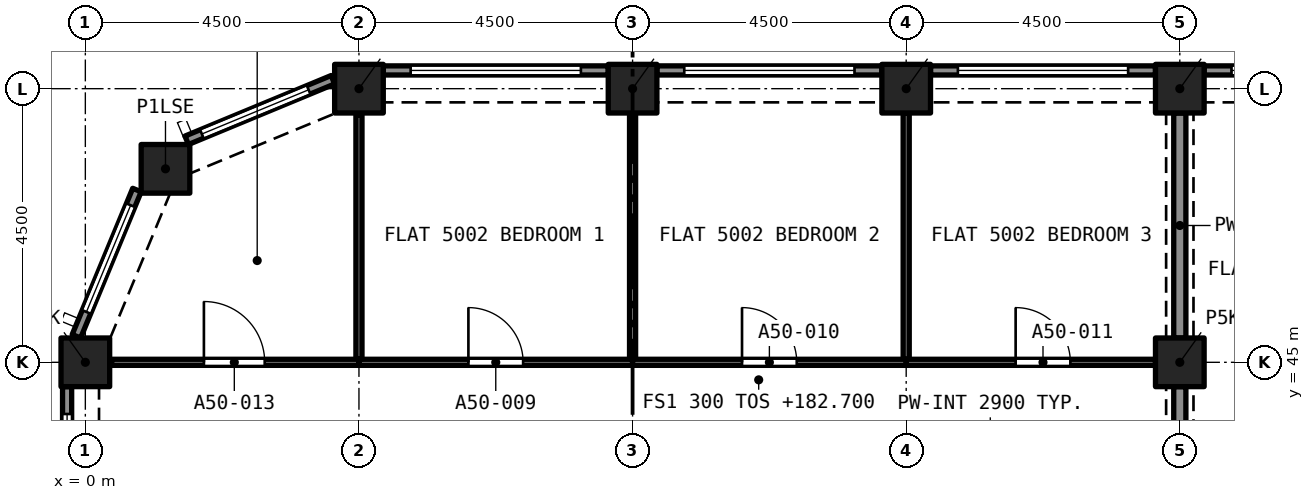
"""IFC4 building model, lengths in metres.
Left out: names, types, materials, properties, quantities, classifications, styles, units other than length and angle.
Written with IfcOpenShell. Run it as: python <this file> out.ifc"""

import sys

from ifc_helpers import new_model, si_unit, direction, frame, frame_2d, origin, origin_2d, place, context, subcontext, project, spatial, rectangle, extrude, element, fill, save


model = new_model("IFC4")
c1 = context("Model", 3, precision=1e-05, world=origin(), true_north=direction((0.0, 1.0)))
c2 = subcontext(c1, "Body", "Model", "MODEL_VIEW")
j1 = project(units=[si_unit("LENGTHUNIT", "METRE"), si_unit("PLANEANGLEUNIT", "RADIAN")], contexts=[c1])
p1 = place(None, origin())
s1 = spatial("IfcSite", under=j1, at=p1, CompositionType="ELEMENT")
p2 = place(p1, origin())
s2 = spatial("IfcBuilding", under=s1, at=p2, CompositionType="ELEMENT")
p3 = place(p2, frame((0.0, 0.0, 182.7)))
s3 = spatial("IfcBuildingStorey", under=s2, at=p3, CompositionType="ELEMENT", Elevation=182.7)
for number, where, z_axis, x_axis in (
    (1, (0.0, 45.0, 0.0), (0.0, 0.0, 1.0), (1.0, 0.0, 0.0)),
    (2, (18.0, 45.0, 0.0), (0.0, 0.0, 1.0), (1.0, 0.0, 0.0)),
    (3, (1.318, 48.182, 0.0), (0.0, 0.0, 1.0), (1.0, 0.0, 0.0)),
    (4, (4.5, 49.5, 0.0), (0.0, 0.0, 1.0), (1.0, 0.0, 0.0)),
    (5, (9.0, 49.5, 0.0), (0.0, 0.0, 1.0), (1.0, 0.0, 0.0)),
    (6, (13.5, 49.5, 0.0), (0.0, 0.0, 1.0), (1.0, 0.0, 0.0)),
    (7, (18.0, 49.5, 0.0), (0.0, 0.0, 1.0), (1.0, 0.0, 0.0)),
):
    element("IfcColumn", number, at=place(p3, frame(where, z_axis=z_axis, x_axis=x_axis)), inside=s3, PredefinedType="COLUMN", context=c2, shape_type="SweptSolid", body=[
        extrude(rectangle(XDim=0.8, YDim=0.8, at=origin_2d()), origin(), (0.0, 0.0, 1.0), 3.2),
    ])
p4 = place(p3, frame((18.4, 49.8, 0.0), z_axis=(0.0, 0.0, 1.0), x_axis=(1.0, 0.0, 0.0)))
e8 = element("IfcWall", 8, at=p4, inside=s3, PredefinedType="SOLIDWALL", context=c2, shape_type="SweptSolid", body=[
    extrude(rectangle(XDim=3.7, YDim=0.15, at=frame_2d((1.85, 0.0))), origin(), (0.0, 0.0, 1.0), 3.2),
])
p5 = place(p4, frame((0.45, 0.0, 0.45)))
e9 = element("IfcOpeningElement", 9, at=p5, cuts=e8, PredefinedType="OPENING", context=c2, shape_type="SweptSolid", body=[
    extrude(rectangle(XDim=2.8, YDim=1.95, at=frame_2d((1.4, 0.975))), frame((0.0, 0.085, 0.0), z_axis=(0.0, -1.0, 0.0), x_axis=(1.0, 0.0, 0.0)), (0.0, 0.0, 1.0), 0.17),
])
p6 = place(p3, frame((13.9, 49.8, 0.0), z_axis=(0.0, 0.0, 1.0), x_axis=(1.0, 0.0, 0.0)))
e10 = element("IfcWall", 10, at=p6, inside=s3, PredefinedType="SOLIDWALL", context=c2, shape_type="SweptSolid", body=[
    extrude(rectangle(XDim=3.7, YDim=0.15, at=frame_2d((1.85, 0.0))), origin(), (0.0, 0.0, 1.0), 3.2),
])
p7 = place(p6, frame((0.45, 0.0, 0.45)))
e11 = element("IfcOpeningElement", 11, at=p7, cuts=e10, PredefinedType="OPENING", context=c2, shape_type="SweptSolid", body=[
    extrude(rectangle(XDim=2.8, YDim=1.95, at=frame_2d((1.4, 0.975))), frame((0.0, 0.085, 0.0), z_axis=(0.0, -1.0, 0.0), x_axis=(1.0, 0.0, 0.0)), (0.0, 0.0, 1.0), 0.17),
])
p8 = place(p3, frame((9.4, 49.8, 0.0), z_axis=(0.0, 0.0, 1.0), x_axis=(1.0, 0.0, 0.0)))
e12 = element("IfcWall", 12, at=p8, inside=s3, PredefinedType="SOLIDWALL", context=c2, shape_type="SweptSolid", body=[
    extrude(rectangle(XDim=3.7, YDim=0.15, at=frame_2d((1.85, 0.0))), origin(), (0.0, 0.0, 1.0), 3.2),
])
p9 = place(p8, frame((0.45, 0.0, 0.45)))
e13 = element("IfcOpeningElement", 13, at=p9, cuts=e12, PredefinedType="OPENING", context=c2, shape_type="SweptSolid", body=[
    extrude(rectangle(XDim=2.8, YDim=1.95, at=frame_2d((1.4, 0.975))), frame((0.0, 0.085, 0.0), z_axis=(0.0, -1.0, 0.0), x_axis=(1.0, 0.0, 0.0)), (0.0, 0.0, 1.0), 0.17),
])
p10 = place(p3, frame((4.9, 49.8, 0.0), z_axis=(0.0, 0.0, 1.0), x_axis=(1.0, 0.0, 0.0)))
e14 = element("IfcWall", 14, at=p10, inside=s3, PredefinedType="SOLIDWALL", context=c2, shape_type="SweptSolid", body=[
    extrude(rectangle(XDim=3.7, YDim=0.15, at=frame_2d((1.85, 0.0))), origin(), (0.0, 0.0, 1.0), 3.2),
])
p11 = place(p10, frame((0.45, 0.0, 0.45)))
e15 = element("IfcOpeningElement", 15, at=p11, cuts=e14, PredefinedType="OPENING", context=c2, shape_type="SweptSolid", body=[
    extrude(rectangle(XDim=2.8, YDim=1.95, at=frame_2d((1.4, 0.975))), frame((0.0, 0.085, 0.0), z_axis=(0.0, -1.0, 0.0), x_axis=(1.0, 0.0, 0.0)), (0.0, 0.0, 1.0), 0.17),
])
p12 = place(p3, frame((1.667, 48.651, 0.0), z_axis=(0.0, 0.0, 1.0), x_axis=(0.923885342263, 0.382669406082, 0.0)))
e16 = element("IfcWall", 16, at=p12, inside=s3, PredefinedType="SOLIDWALL", context=c2, shape_type="SweptSolid", body=[
    extrude(rectangle(XDim=2.602, YDim=0.15, at=frame_2d((1.301, 0.0))), origin(), (0.0, 0.0, 1.0), 3.2),
])
p13 = place(p12, frame((0.27, 0.0, 0.45)))
e17 = element("IfcOpeningElement", 17, at=p13, cuts=e16, PredefinedType="OPENING", context=c2, shape_type="SweptSolid", body=[
    extrude(rectangle(XDim=1.9, YDim=1.95, at=frame_2d((0.95, 0.975))), frame((0.0, 0.085, 0.0), z_axis=(0.0, -1.0, 0.0), x_axis=(1.0, 0.0, 0.0)), (0.0, 0.0, 1.0), 0.17),
])
p14 = place(p3, frame((-0.147, 45.429, 0.0), z_axis=(0.0, 0.0, 1.0), x_axis=(0.382669406082, 0.923885342263, 0.0)))
e18 = element("IfcWall", 18, at=p14, inside=s3, PredefinedType="SOLIDWALL", context=c2, shape_type="SweptSolid", body=[
    extrude(rectangle(XDim=2.602, YDim=0.15, at=frame_2d((1.301, 0.0))), origin(), (0.0, 0.0, 1.0), 3.2),
])
p15 = place(p14, frame((0.432, 0.0, 0.45)))
e19 = element("IfcOpeningElement", 19, at=p15, cuts=e18, PredefinedType="OPENING", context=c2, shape_type="SweptSolid", body=[
    extrude(rectangle(XDim=1.9, YDim=1.95, at=frame_2d((0.95, 0.975))), frame((0.0, 0.085, 0.0), z_axis=(0.0, -1.0, 0.0), x_axis=(1.0, 0.0, 0.0)), (0.0, 0.0, 1.0), 0.17),
])
p16 = place(p3, frame((-0.3, 40.9, 0.0), z_axis=(0.0, 0.0, 1.0), x_axis=(0.0, 1.0, 0.0)))
e20 = element("IfcWall", 20, at=p16, inside=s3, PredefinedType="SOLIDWALL", context=c2, shape_type="SweptSolid", body=[
    extrude(rectangle(XDim=3.7, YDim=0.15, at=frame_2d((1.85, 0.0))), origin(), (0.0, 0.0, 1.0), 3.2),
])
p17 = place(p16, frame((0.45, 0.0, 0.45)))
e21 = element("IfcOpeningElement", 21, at=p17, cuts=e20, PredefinedType="OPENING", context=c2, shape_type="SweptSolid", body=[
    extrude(rectangle(XDim=2.8, YDim=1.95, at=frame_2d((1.4, 0.975))), frame((0.0, 0.085, 0.0), z_axis=(0.0, -1.0, 0.0), x_axis=(1.0, 0.0, 0.0)), (0.0, 0.0, 1.0), 0.17),
])
p18 = place(p3, frame((9.0, 45.05, 0.0), z_axis=(0.0, 0.0, 1.0), x_axis=(0.0, 1.0, 0.0)))
e22 = element("IfcWall", 22, at=p18, inside=s3, PredefinedType="PARTITIONING", context=c2, shape_type="SweptSolid", body=[
    extrude(rectangle(XDim=4.05, YDim=0.1, at=frame_2d((2.025, 0.0))), origin(), (0.0, 0.0, 1.0), 2.9),
])
p19 = place(p3, frame((4.5, 45.0, 0.0), z_axis=(0.0, 0.0, 1.0), x_axis=(1.0, 0.0, 0.0)))
e23 = element("IfcWall", 23, at=p19, inside=s3, PredefinedType="PARTITIONING", context=c2, shape_type="SweptSolid", body=[
    extrude(rectangle(XDim=4.5, YDim=0.1, at=frame_2d((2.25, 0.0))), origin(), (0.0, 0.0, 1.0), 2.9),
])
p20 = place(p19, frame((1.8, 0.0, 0.0)))
e24 = element("IfcOpeningElement", 24, at=p20, cuts=e23, PredefinedType="OPENING", context=c2, shape_type="SweptSolid", body=[
    extrude(rectangle(XDim=0.9, YDim=2.1, at=frame_2d((0.45, 1.05))), frame((0.0, 0.06, 0.0), z_axis=(0.0, -1.0, 0.0), x_axis=(1.0, 0.0, 0.0)), (0.0, 0.0, 1.0), 0.12),
])
p21 = place(p3, frame((4.5, 45.05, 0.0), z_axis=(0.0, 0.0, 1.0), x_axis=(0.0, 1.0, 0.0)))
e25 = element("IfcWall", 25, at=p21, inside=s3, PredefinedType="PARTITIONING", context=c2, shape_type="SweptSolid", body=[
    extrude(rectangle(XDim=4.017, YDim=0.1, at=frame_2d((2.009, 0.0))), origin(), (0.0, 0.0, 1.0), 2.9),
])
p22 = place(p3, frame((13.5, 45.05, 0.0), z_axis=(0.0, 0.0, 1.0), x_axis=(0.0, 1.0, 0.0)))
e26 = element("IfcWall", 26, at=p22, inside=s3, PredefinedType="PARTITIONING", context=c2, shape_type="SweptSolid", body=[
    extrude(rectangle(XDim=4.05, YDim=0.1, at=frame_2d((2.025, 0.0))), origin(), (0.0, 0.0, 1.0), 2.9),
])
p23 = place(p3, frame((9.0, 45.0, 0.0), z_axis=(0.0, 0.0, 1.0), x_axis=(1.0, 0.0, 0.0)))
e27 = element("IfcWall", 27, at=p23, inside=s3, PredefinedType="PARTITIONING", context=c2, shape_type="SweptSolid", body=[
    extrude(rectangle(XDim=4.5, YDim=0.1, at=frame_2d((2.25, 0.0))), origin(), (0.0, 0.0, 1.0), 2.9),
])
p24 = place(p23, frame((1.8, 0.0, 0.0)))
e28 = element("IfcOpeningElement", 28, at=p24, cuts=e27, PredefinedType="OPENING", context=c2, shape_type="SweptSolid", body=[
    extrude(rectangle(XDim=0.9, YDim=2.1, at=frame_2d((0.45, 1.05))), frame((0.0, 0.06, 0.0), z_axis=(0.0, -1.0, 0.0), x_axis=(1.0, 0.0, 0.0)), (0.0, 0.0, 1.0), 0.12),
])
p25 = place(p3, frame((13.5, 45.0, 0.0), z_axis=(0.0, 0.0, 1.0), x_axis=(1.0, 0.0, 0.0)))
e29 = element("IfcWall", 29, at=p25, inside=s3, PredefinedType="PARTITIONING", context=c2, shape_type="SweptSolid", body=[
    extrude(rectangle(XDim=4.1, YDim=0.1, at=frame_2d((2.05, 0.0))), origin(), (0.0, 0.0, 1.0), 2.9),
])
p26 = place(p25, frame((1.8, 0.0, 0.0)))
e30 = element("IfcOpeningElement", 30, at=p26, cuts=e29, PredefinedType="OPENING", context=c2, shape_type="SweptSolid", body=[
    extrude(rectangle(XDim=0.9, YDim=2.1, at=frame_2d((0.45, 1.05))), frame((0.0, 0.06, 0.0), z_axis=(0.0, -1.0, 0.0), x_axis=(1.0, 0.0, 0.0)), (0.0, 0.0, 1.0), 0.12),
])
p27 = place(p3, frame((18.0, 45.4, 0.0), z_axis=(0.0, 0.0, 1.0), x_axis=(0.0, 1.0, 0.0)))
e31 = element("IfcWall", 31, at=p27, inside=s3, PredefinedType="PARTITIONING", context=c2, shape_type="SweptSolid", body=[
    extrude(rectangle(XDim=3.7, YDim=0.2, at=frame_2d((1.85, 0.0))), origin(), (0.0, 0.0, 1.0), 2.38),
])
p28 = place(p3, frame((0.433, 45.0, 0.0), z_axis=(0.0, 0.0, 1.0), x_axis=(1.0, 0.0, 0.0)))
e32 = element("IfcWall", 32, at=p28, inside=s3, PredefinedType="PARTITIONING", context=c2, shape_type="SweptSolid", body=[
    extrude(rectangle(XDim=4.067, YDim=0.1, at=frame_2d((2.034, 0.0))), origin(), (0.0, 0.0, 1.0), 2.9),
])
p29 = place(p28, frame((1.517, 0.0, 0.0)))
e33 = element("IfcOpeningElement", 33, at=p29, cuts=e32, PredefinedType="OPENING", context=c2, shape_type="SweptSolid", body=[
    extrude(rectangle(XDim=1.0, YDim=2.1, at=frame_2d((0.5, 1.05))), frame((0.0, 0.06, 0.0), z_axis=(0.0, -1.0, 0.0), x_axis=(1.0, 0.0, 0.0)), (0.0, 0.0, 1.0), 0.12),
])
p30 = place(p3, frame((18.0, 40.9, 0.0), z_axis=(0.0, 0.0, 1.0), x_axis=(0.0, 1.0, 0.0)))
e34 = element("IfcWall", 34, at=p30, inside=s3, PredefinedType="PARTITIONING", context=c2, shape_type="SweptSolid", body=[
    extrude(rectangle(XDim=3.7, YDim=0.2, at=frame_2d((1.85, 0.0))), origin(), (0.0, 0.0, 1.0), 2.38),
])
p31 = place(p5, origin())
e35 = element("IfcWindow", 35, at=p31, inside=s3, PartitioningType="SINGLE_PANEL", PredefinedType="WINDOW", context=c2, shape_type="SweptSolid", body=[
    extrude(rectangle(XDim=2.8, YDim=1.95, at=frame_2d((1.4, 0.975))), frame((0.0, 0.03, 0.0), z_axis=(0.0, -1.0, 0.0), x_axis=(1.0, 0.0, 0.0)), (0.0, 0.0, 1.0), 0.06),
])
fill(e9, e35)
p32 = place(p7, origin())
e36 = element("IfcWindow", 36, at=p32, inside=s3, PartitioningType="SINGLE_PANEL", PredefinedType="WINDOW", context=c2, shape_type="SweptSolid", body=[
    extrude(rectangle(XDim=2.8, YDim=1.95, at=frame_2d((1.4, 0.975))), frame((0.0, 0.03, 0.0), z_axis=(0.0, -1.0, 0.0), x_axis=(1.0, 0.0, 0.0)), (0.0, 0.0, 1.0), 0.06),
])
fill(e11, e36)
p33 = place(p9, origin())
e37 = element("IfcWindow", 37, at=p33, inside=s3, PartitioningType="SINGLE_PANEL", PredefinedType="WINDOW", context=c2, shape_type="SweptSolid", body=[
    extrude(rectangle(XDim=2.8, YDim=1.95, at=frame_2d((1.4, 0.975))), frame((0.0, 0.03, 0.0), z_axis=(0.0, -1.0, 0.0), x_axis=(1.0, 0.0, 0.0)), (0.0, 0.0, 1.0), 0.06),
])
fill(e13, e37)
p34 = place(p11, origin())
e38 = element("IfcWindow", 38, at=p34, inside=s3, PartitioningType="SINGLE_PANEL", PredefinedType="WINDOW", context=c2, shape_type="SweptSolid", body=[
    extrude(rectangle(XDim=2.8, YDim=1.95, at=frame_2d((1.4, 0.975))), frame((0.0, 0.03, 0.0), z_axis=(0.0, -1.0, 0.0), x_axis=(1.0, 0.0, 0.0)), (0.0, 0.0, 1.0), 0.06),
])
fill(e15, e38)
p35 = place(p13, origin())
e39 = element("IfcWindow", 39, at=p35, inside=s3, PartitioningType="SINGLE_PANEL", PredefinedType="WINDOW", context=c2, shape_type="SweptSolid", body=[
    extrude(rectangle(XDim=1.9, YDim=1.95, at=frame_2d((0.95, 0.975))), frame((0.0, 0.03, 0.0), z_axis=(0.0, -1.0, 0.0), x_axis=(1.0, 0.0, 0.0)), (0.0, 0.0, 1.0), 0.06),
])
fill(e17, e39)
p36 = place(p15, origin())
e40 = element("IfcWindow", 40, at=p36, inside=s3, PartitioningType="SINGLE_PANEL", PredefinedType="WINDOW", context=c2, shape_type="SweptSolid", body=[
    extrude(rectangle(XDim=1.9, YDim=1.95, at=frame_2d((0.95, 0.975))), frame((0.0, 0.03, 0.0), z_axis=(0.0, -1.0, 0.0), x_axis=(1.0, 0.0, 0.0)), (0.0, 0.0, 1.0), 0.06),
])
fill(e19, e40)
p37 = place(p17, origin())
e41 = element("IfcWindow", 41, at=p37, inside=s3, PartitioningType="SINGLE_PANEL", PredefinedType="WINDOW", context=c2, shape_type="SweptSolid", body=[
    extrude(rectangle(XDim=2.8, YDim=1.95, at=frame_2d((1.4, 0.975))), frame((0.0, 0.03, 0.0), z_axis=(0.0, -1.0, 0.0), x_axis=(1.0, 0.0, 0.0)), (0.0, 0.0, 1.0), 0.06),
])
fill(e21, e41)
p38 = place(p20, origin())
e42 = element("IfcDoor", 42, at=p38, inside=s3, OperationType="SINGLE_SWING_LEFT", PredefinedType="DOOR", context=c2, shape_type="SweptSolid", body=[
    extrude(rectangle(XDim=0.9, YDim=2.1, at=frame_2d((0.45, 1.05))), frame((0.0, 0.025, 0.0), z_axis=(0.0, -1.0, 0.0), x_axis=(1.0, 0.0, 0.0)), (0.0, 0.0, 1.0), 0.05),
])
fill(e24, e42)
p39 = place(p24, origin())
e43 = element("IfcDoor", 43, at=p39, inside=s3, OperationType="SINGLE_SWING_LEFT", PredefinedType="DOOR", context=c2, shape_type="SweptSolid", body=[
    extrude(rectangle(XDim=0.9, YDim=2.1, at=frame_2d((0.45, 1.05))), frame((0.0, 0.025, 0.0), z_axis=(0.0, -1.0, 0.0), x_axis=(1.0, 0.0, 0.0)), (0.0, 0.0, 1.0), 0.05),
])
fill(e28, e43)
p40 = place(p26, origin())
e44 = element("IfcDoor", 44, at=p40, inside=s3, OperationType="SINGLE_SWING_RIGHT", PredefinedType="DOOR", context=c2, shape_type="SweptSolid", body=[
    extrude(rectangle(XDim=0.9, YDim=2.1, at=frame_2d((0.45, 1.05))), frame((0.0, 0.025, 0.0), z_axis=(0.0, -1.0, 0.0), x_axis=(1.0, 0.0, 0.0)), (0.0, 0.0, 1.0), 0.05),
])
fill(e30, e44)
p41 = place(p29, origin())
e45 = element("IfcDoor", 45, at=p41, inside=s3, OperationType="SINGLE_SWING_LEFT", PredefinedType="DOOR", context=c2, shape_type="SweptSolid", body=[
    extrude(rectangle(XDim=1.0, YDim=2.1, at=frame_2d((0.5, 1.05))), frame((0.0, 0.025, 0.0), z_axis=(0.0, -1.0, 0.0), x_axis=(1.0, 0.0, 0.0)), (0.0, 0.0, 1.0), 0.05),
])
fill(e33, e45)
save(model, sys.argv[1])
